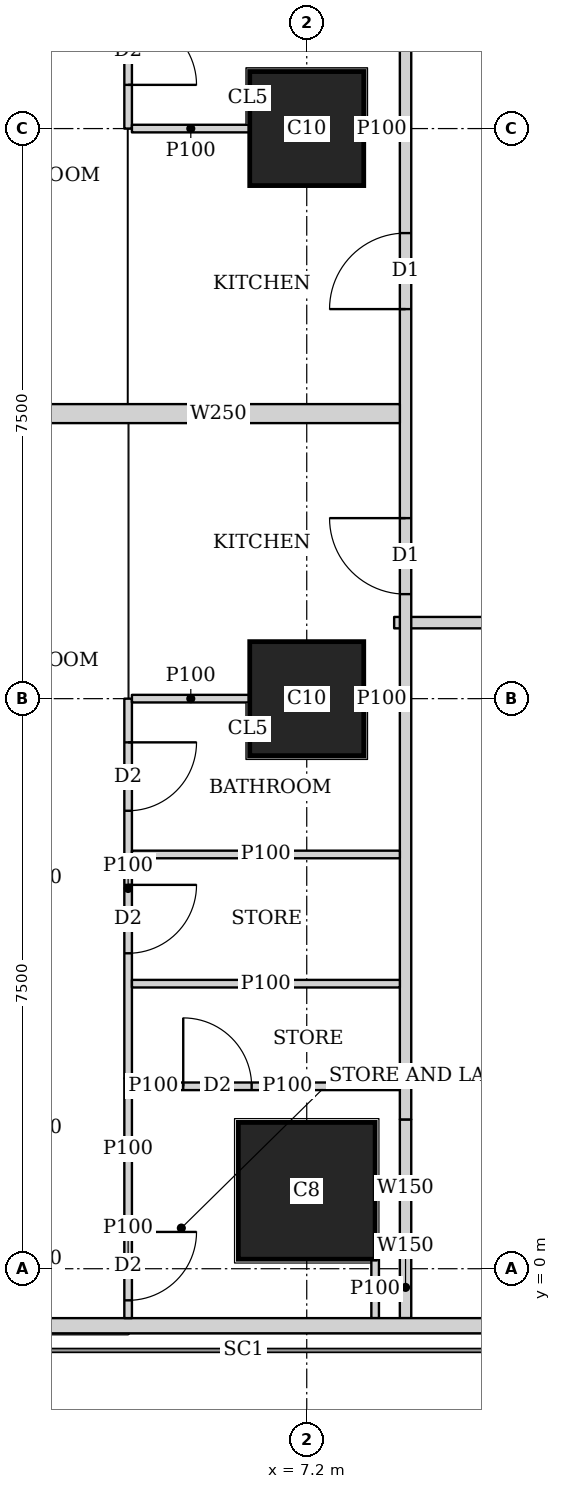
"""IFC4 building model, lengths in metres.
Left out: names, types, materials, properties, quantities, classifications, styles, units other than length and angle.
Written with IfcOpenShell. Run it as: python <this file> out.ifc"""

import sys

from ifc_helpers import new_model, si_unit, direction, frame, frame_2d, origin, origin_2d, place, context, subcontext, project, spatial, rectangle, extrude, element, fill, save


model = new_model("IFC4")
c1 = context("Model", 3, precision=1e-05, world=origin(), true_north=direction((0.0, 1.0)))
c2 = subcontext(c1, "Body", "Model", "MODEL_VIEW")
j1 = project(units=[si_unit("LENGTHUNIT", "METRE"), si_unit("PLANEANGLEUNIT", "RADIAN")], contexts=[c1])
p1 = place(None, origin())
s1 = spatial("IfcSite", under=j1, at=p1, CompositionType="ELEMENT")
p2 = place(p1, origin())
s2 = spatial("IfcBuilding", under=s1, at=p2, CompositionType="ELEMENT")
p3 = place(p2, frame((0.0, 0.0, 135.8)))
s3 = spatial("IfcBuildingStorey", under=s2, at=p3, CompositionType="ELEMENT", Elevation=135.8)
p4 = place(p3, frame((7.2, 1.025, 0.0), z_axis=(0.0, 0.0, 1.0), x_axis=(1.0, 0.0, 0.0)))
e1 = element("IfcColumn", 1, at=p4, inside=s3, PredefinedType="COLUMN", context=c2, shape_type="SweptSolid", body=[
    extrude(rectangle(XDim=1.8, YDim=1.8, at=origin_2d()), origin(), (0.0, 0.0, 1.0), 3.75),
])
for number, where, z_axis, x_axis in (
    (2, (7.2, 7.5, 0.0), (0.0, 0.0, 1.0), (1.0, 0.0, 0.0)),
    (3, (7.2, 15.0, 0.0), (0.0, 0.0, 1.0), (1.0, 0.0, 0.0)),
):
    element("IfcColumn", number, at=place(p3, frame(where, z_axis=z_axis, x_axis=x_axis)), inside=s3, PredefinedType="COLUMN", context=c2, shape_type="SweptSolid", body=[
        extrude(rectangle(XDim=1.5, YDim=1.5, at=origin_2d()), origin(), (0.0, 0.0, 1.0), 3.75),
    ])
p5 = place(p3, frame((2.163, -0.75, 0.0), z_axis=(0.0, 0.0, 1.0), x_axis=(1.0, 0.0, 0.0)))
e4 = element("IfcWall", 4, at=p5, inside=s3, PredefinedType="SOLIDWALL", context=c2, shape_type="SweptSolid", body=[
    extrude(rectangle(XDim=45.628, YDim=0.2, at=frame_2d((22.814, 0.0))), origin(), (0.0, 0.0, 1.0), 3.5),
])
p6 = place(p5, frame((9.537, 0.0, 0.9)))
e5 = element("IfcOpeningElement", 5, at=p6, cuts=e4, PredefinedType="OPENING", context=c2, shape_type="SweptSolid", body=[
    extrude(rectangle(XDim=1.8, YDim=1.5, at=frame_2d((0.9, 0.75))), frame((0.0, 0.11, 0.0), z_axis=(0.0, -1.0, 0.0), x_axis=(1.0, 0.0, 0.0)), (0.0, 0.0, 1.0), 0.22),
])
p7 = place(p5, frame((13.137, 0.0, 0.9)))
e6 = element("IfcOpeningElement", 6, at=p7, cuts=e4, PredefinedType="OPENING", context=c2, shape_type="SweptSolid", body=[
    extrude(rectangle(XDim=1.8, YDim=1.5, at=frame_2d((0.9, 0.75))), frame((0.0, 0.11, 0.0), z_axis=(0.0, -1.0, 0.0), x_axis=(1.0, 0.0, 0.0)), (0.0, 0.0, 1.0), 0.22),
])
p8 = place(p5, frame((16.737, 0.0, 0.9)))
e7 = element("IfcOpeningElement", 7, at=p8, cuts=e4, PredefinedType="OPENING", context=c2, shape_type="SweptSolid", body=[
    extrude(rectangle(XDim=1.8, YDim=1.5, at=frame_2d((0.9, 0.75))), frame((0.0, 0.11, 0.0), z_axis=(0.0, -1.0, 0.0), x_axis=(1.0, 0.0, 0.0)), (0.0, 0.0, 1.0), 0.22),
])
p9 = place(p5, frame((20.337, 0.0, 0.9)))
e8 = element("IfcOpeningElement", 8, at=p9, cuts=e4, PredefinedType="OPENING", context=c2, shape_type="SweptSolid", body=[
    extrude(rectangle(XDim=1.8, YDim=1.5, at=frame_2d((0.9, 0.75))), frame((0.0, 0.11, 0.0), z_axis=(0.0, -1.0, 0.0), x_axis=(1.0, 0.0, 0.0)), (0.0, 0.0, 1.0), 0.22),
])
p10 = place(p5, frame((23.937, 0.0, 0.9)))
e9 = element("IfcOpeningElement", 9, at=p10, cuts=e4, PredefinedType="OPENING", context=c2, shape_type="SweptSolid", body=[
    extrude(rectangle(XDim=1.8, YDim=1.5, at=frame_2d((0.9, 0.75))), frame((0.0, 0.11, 0.0), z_axis=(0.0, -1.0, 0.0), x_axis=(1.0, 0.0, 0.0)), (0.0, 0.0, 1.0), 0.22),
])
p11 = place(p5, frame((27.537, 0.0, 0.9)))
e10 = element("IfcOpeningElement", 10, at=p11, cuts=e4, PredefinedType="OPENING", context=c2, shape_type="SweptSolid", body=[
    extrude(rectangle(XDim=1.8, YDim=1.5, at=frame_2d((0.9, 0.75))), frame((0.0, 0.11, 0.0), z_axis=(0.0, -1.0, 0.0), x_axis=(1.0, 0.0, 0.0)), (0.0, 0.0, 1.0), 0.22),
])
p12 = place(p5, frame((31.137, 0.0, 0.9)))
e11 = element("IfcOpeningElement", 11, at=p12, cuts=e4, PredefinedType="OPENING", context=c2, shape_type="SweptSolid", body=[
    extrude(rectangle(XDim=1.8, YDim=1.5, at=frame_2d((0.9, 0.75))), frame((0.0, 0.11, 0.0), z_axis=(0.0, -1.0, 0.0), x_axis=(1.0, 0.0, 0.0)), (0.0, 0.0, 1.0), 0.22),
])
p13 = place(p5, frame((34.737, 0.0, 0.9)))
e12 = element("IfcOpeningElement", 12, at=p13, cuts=e4, PredefinedType="OPENING", context=c2, shape_type="SweptSolid", body=[
    extrude(rectangle(XDim=1.8, YDim=1.5, at=frame_2d((0.9, 0.75))), frame((0.0, 0.11, 0.0), z_axis=(0.0, -1.0, 0.0), x_axis=(1.0, 0.0, 0.0)), (0.0, 0.0, 1.0), 0.22),
])
p14 = place(p3, frame((8.5, -0.65, 0.0), z_axis=(0.0, 0.0, 1.0), x_axis=(0.0, 1.0, 0.0)))
e13 = element("IfcWall", 13, at=p14, inside=s3, PredefinedType="SOLIDWALL", context=c2, shape_type="SweptSolid", body=[
    extrude(rectangle(XDim=0.809, YDim=0.15, at=frame_2d((0.404, 0.0))), origin(), (0.0, 0.0, 1.0), 3.5),
])
p15 = place(p3, frame((8.5, 0.159, 0.0), z_axis=(0.0, 0.0, 1.0), x_axis=(0.0, 1.0, 0.0)))
e14 = element("IfcWall", 14, at=p15, inside=s3, PredefinedType="SOLIDWALL", context=c2, shape_type="SweptSolid", body=[
    extrude(rectangle(XDim=1.805, YDim=0.15, at=frame_2d((0.903, 0.0))), origin(), (0.0, 0.0, 1.0), 2.1),
])
p16 = place(p3, frame((8.5, 1.964, 0.0), z_axis=(0.0, 0.0, 1.0), x_axis=(0.0, 1.0, 0.0)))
e15 = element("IfcWall", 15, at=p16, inside=s3, PredefinedType="SOLIDWALL", context=c2, shape_type="SweptSolid", body=[
    extrude(rectangle(XDim=41.097, YDim=0.15, at=frame_2d((20.548, 0.0))), origin(), (0.0, 0.0, 1.0), 3.5),
])
p17 = place(p16, frame((6.911, 0.0, 0.0)))
e16 = element("IfcOpeningElement", 16, at=p17, cuts=e15, PredefinedType="OPENING", context=c2, shape_type="SweptSolid", body=[
    extrude(rectangle(XDim=1.0, YDim=2.1, at=frame_2d((0.5, 1.05))), frame((0.0, 0.085, 0.0), z_axis=(0.0, -1.0, 0.0), x_axis=(1.0, 0.0, 0.0)), (0.0, 0.0, 1.0), 0.17),
])
p18 = place(p16, frame((10.661, 0.0, 0.0)))
e17 = element("IfcOpeningElement", 17, at=p18, cuts=e15, PredefinedType="OPENING", context=c2, shape_type="SweptSolid", body=[
    extrude(rectangle(XDim=1.0, YDim=2.1, at=frame_2d((0.5, 1.05))), frame((0.0, 0.085, 0.0), z_axis=(0.0, -1.0, 0.0), x_axis=(1.0, 0.0, 0.0)), (0.0, 0.0, 1.0), 0.17),
])
p19 = place(p16, frame((25.661, 0.0, 0.0)))
e18 = element("IfcOpeningElement", 18, at=p19, cuts=e15, PredefinedType="OPENING", context=c2, shape_type="SweptSolid", body=[
    extrude(rectangle(XDim=1.0, YDim=2.1, at=frame_2d((0.5, 1.05))), frame((0.0, 0.085, 0.0), z_axis=(0.0, -1.0, 0.0), x_axis=(1.0, 0.0, 0.0)), (0.0, 0.0, 1.0), 0.17),
])
p20 = place(p16, frame((33.161, 0.0, 0.0)))
e19 = element("IfcOpeningElement", 19, at=p20, cuts=e15, PredefinedType="OPENING", context=c2, shape_type="SweptSolid", body=[
    extrude(rectangle(XDim=1.0, YDim=2.1, at=frame_2d((0.5, 1.05))), frame((0.0, 0.085, 0.0), z_axis=(0.0, -1.0, 0.0), x_axis=(1.0, 0.0, 0.0)), (0.0, 0.0, 1.0), 0.17),
])
p21 = place(p3, frame((20.599, 8.5, 0.0), z_axis=(0.0, 0.0, 1.0), x_axis=(-1.0, 0.0, 0.0)))
e20 = element("IfcWall", 20, at=p21, inside=s3, PredefinedType="SOLIDWALL", context=c2, shape_type="SweptSolid", body=[
    extrude(rectangle(XDim=12.249, YDim=0.15, at=frame_2d((6.125, 0.0))), origin(), (0.0, 0.0, 1.0), 3.5),
])
p22 = place(p21, frame((8.649, 0.0, 0.0)))
e21 = element("IfcOpeningElement", 21, at=p22, cuts=e20, PredefinedType="OPENING", context=c2, shape_type="SweptSolid", body=[
    extrude(rectangle(XDim=1.0, YDim=2.1, at=frame_2d((0.5, 1.05))), frame((0.0, 0.085, 0.0), z_axis=(0.0, -1.0, 0.0), x_axis=(1.0, 0.0, 0.0)), (0.0, 0.0, 1.0), 0.17),
])
p23 = place(p21, frame((0.699, 0.0, 0.0)))
e22 = element("IfcOpeningElement", 22, at=p23, cuts=e20, PredefinedType="OPENING", context=c2, shape_type="SweptSolid", body=[
    extrude(rectangle(XDim=1.0, YDim=2.1, at=frame_2d((0.5, 1.05))), frame((0.0, 0.085, 0.0), z_axis=(0.0, -1.0, 0.0), x_axis=(1.0, 0.0, 0.0)), (0.0, 0.0, 1.0), 0.17),
])
p24 = place(p3, frame((8.1, 0.124, 0.0), z_axis=(0.0, 0.0, 1.0), x_axis=(0.0, -1.0, 0.0)))
e23 = element("IfcWall", 23, at=p24, inside=s3, PredefinedType="PARTITIONING", context=c2, shape_type="SweptSolid", body=[
    extrude(rectangle(XDim=0.774, YDim=0.1, at=frame_2d((0.387, 0.0))), origin(), (0.0, 0.0, 1.0), 3.5),
])
p25 = place(p3, frame((4.85, -0.65, 0.0), z_axis=(0.0, 0.0, 1.0), x_axis=(0.0, 1.0, 0.0)))
e24 = element("IfcWall", 24, at=p25, inside=s3, PredefinedType="PARTITIONING", context=c2, shape_type="SweptSolid", body=[
    extrude(rectangle(XDim=1.284, YDim=0.1, at=frame_2d((0.642, 0.0))), origin(), (0.0, 0.0, 1.0), 3.5),
])
p26 = place(p25, frame((0.234, 0.0, 0.0)))
e25 = element("IfcOpeningElement", 25, at=p26, cuts=e24, PredefinedType="OPENING", context=c2, shape_type="SweptSolid", body=[
    extrude(rectangle(XDim=0.9, YDim=2.1, at=frame_2d((0.45, 1.05))), frame((0.0, 0.06, 0.0), z_axis=(0.0, -1.0, 0.0), x_axis=(1.0, 0.0, 0.0)), (0.0, 0.0, 1.0), 0.12),
])
p27 = place(p3, frame((4.85, 0.634, 0.0), z_axis=(0.0, 0.0, 1.0), x_axis=(0.0, 1.0, 0.0)))
e26 = element("IfcWall", 26, at=p27, inside=s3, PredefinedType="PARTITIONING", context=c2, shape_type="SweptSolid", body=[
    extrude(rectangle(XDim=1.871, YDim=0.1, at=frame_2d((0.936, 0.0))), origin(), (0.0, 0.0, 1.0), 2.1),
])
p28 = place(p3, frame((4.85, 2.505, 0.0), z_axis=(0.0, 0.0, 1.0), x_axis=(0.0, 1.0, 0.0)))
e27 = element("IfcWall", 27, at=p28, inside=s3, PredefinedType="PARTITIONING", context=c2, shape_type="SweptSolid", body=[
    extrude(rectangle(XDim=4.995, YDim=0.1, at=frame_2d((2.498, 0.0))), origin(), (0.0, 0.0, 1.0), 3.5),
])
p29 = place(p28, frame((3.52, 0.0, 0.0)))
e28 = element("IfcOpeningElement", 28, at=p29, cuts=e27, PredefinedType="OPENING", context=c2, shape_type="SweptSolid", body=[
    extrude(rectangle(XDim=0.9, YDim=2.1, at=frame_2d((0.45, 1.05))), frame((0.0, 0.06, 0.0), z_axis=(0.0, -1.0, 0.0), x_axis=(1.0, 0.0, 0.0)), (0.0, 0.0, 1.0), 0.12),
])
p30 = place(p28, frame((1.645, 0.0, 0.0)))
e29 = element("IfcOpeningElement", 29, at=p30, cuts=e27, PredefinedType="OPENING", context=c2, shape_type="SweptSolid", body=[
    extrude(rectangle(XDim=0.9, YDim=2.1, at=frame_2d((0.45, 1.05))), frame((0.0, 0.06, 0.0), z_axis=(0.0, -1.0, 0.0), x_axis=(1.0, 0.0, 0.0)), (0.0, 0.0, 1.0), 0.12),
])
p31 = place(p3, frame((4.9, 3.75, 0.0), z_axis=(0.0, 0.0, 1.0), x_axis=(1.0, 0.0, 0.0)))
e30 = element("IfcWall", 30, at=p31, inside=s3, PredefinedType="PARTITIONING", context=c2, shape_type="SweptSolid", body=[
    extrude(rectangle(XDim=3.525, YDim=0.1, at=frame_2d((1.763, 0.0))), origin(), (0.0, 0.0, 1.0), 3.5),
])
p32 = place(p3, frame((4.9, 7.5, 0.0), z_axis=(0.0, 0.0, 1.0), x_axis=(1.0, 0.0, 0.0)))
e31 = element("IfcWall", 31, at=p32, inside=s3, PredefinedType="PARTITIONING", context=c2, shape_type="SweptSolid", body=[
    extrude(rectangle(XDim=1.549, YDim=0.1, at=frame_2d((0.774, 0.0))), origin(), (0.0, 0.0, 1.0), 3.5),
])
p33 = place(p3, frame((7.951, 7.5, 0.0), z_axis=(0.0, 0.0, 1.0), x_axis=(1.0, 0.0, 0.0)))
e32 = element("IfcWall", 32, at=p33, inside=s3, PredefinedType="PARTITIONING", context=c2, shape_type="SweptSolid", body=[
    extrude(rectangle(XDim=0.474, YDim=0.1, at=frame_2d((0.237, 0.0))), origin(), (0.0, 0.0, 1.0), 3.5),
])
p34 = place(p3, frame((4.9, 5.45, 0.0), z_axis=(0.0, 0.0, 1.0), x_axis=(1.0, 0.0, 0.0)))
e33 = element("IfcWall", 33, at=p34, inside=s3, PredefinedType="PARTITIONING", context=c2, shape_type="SweptSolid", body=[
    extrude(rectangle(XDim=3.525, YDim=0.1, at=frame_2d((1.763, 0.0))), origin(), (0.0, 0.0, 1.0), 3.5),
])
p35 = place(p3, frame((4.85, 15.0, 0.0), z_axis=(0.0, 0.0, 1.0), x_axis=(0.0, 1.0, 0.0)))
e34 = element("IfcWall", 34, at=p35, inside=s3, PredefinedType="PARTITIONING", context=c2, shape_type="SweptSolid", body=[
    extrude(rectangle(XDim=11.125, YDim=0.1, at=frame_2d((5.562, 0.0))), origin(), (0.0, 0.0, 1.0), 3.5),
])
p36 = place(p35, frame((0.575, 0.0, 0.0)))
e35 = element("IfcOpeningElement", 35, at=p36, cuts=e34, PredefinedType="OPENING", context=c2, shape_type="SweptSolid", body=[
    extrude(rectangle(XDim=0.9, YDim=2.1, at=frame_2d((0.45, 1.05))), frame((0.0, 0.06, 0.0), z_axis=(0.0, -1.0, 0.0), x_axis=(1.0, 0.0, 0.0)), (0.0, 0.0, 1.0), 0.12),
])
p37 = place(p35, frame((4.1, 0.0, 0.0)))
e36 = element("IfcOpeningElement", 36, at=p37, cuts=e34, PredefinedType="OPENING", context=c2, shape_type="SweptSolid", body=[
    extrude(rectangle(XDim=0.9, YDim=2.1, at=frame_2d((0.45, 1.05))), frame((0.0, 0.06, 0.0), z_axis=(0.0, -1.0, 0.0), x_axis=(1.0, 0.0, 0.0)), (0.0, 0.0, 1.0), 0.12),
])
p38 = place(p35, frame((7.9, 0.0, 0.0)))
e37 = element("IfcOpeningElement", 37, at=p38, cuts=e34, PredefinedType="OPENING", context=c2, shape_type="SweptSolid", body=[
    extrude(rectangle(XDim=0.9, YDim=2.1, at=frame_2d((0.45, 1.05))), frame((0.0, 0.06, 0.0), z_axis=(0.0, -1.0, 0.0), x_axis=(1.0, 0.0, 0.0)), (0.0, 0.0, 1.0), 0.12),
])
p39 = place(p35, frame((2.45, 0.0, 0.0)))
e38 = element("IfcOpeningElement", 38, at=p39, cuts=e34, PredefinedType="OPENING", context=c2, shape_type="SweptSolid", body=[
    extrude(rectangle(XDim=0.9, YDim=2.1, at=frame_2d((0.45, 1.05))), frame((0.0, 0.06, 0.0), z_axis=(0.0, -1.0, 0.0), x_axis=(1.0, 0.0, 0.0)), (0.0, 0.0, 1.0), 0.12),
])
p40 = place(p35, frame((5.975, 0.0, 0.0)))
e39 = element("IfcOpeningElement", 39, at=p40, cuts=e34, PredefinedType="OPENING", context=c2, shape_type="SweptSolid", body=[
    extrude(rectangle(XDim=0.9, YDim=2.1, at=frame_2d((0.45, 1.05))), frame((0.0, 0.06, 0.0), z_axis=(0.0, -1.0, 0.0), x_axis=(1.0, 0.0, 0.0)), (0.0, 0.0, 1.0), 0.12),
])
p41 = place(p35, frame((9.775, 0.0, 0.0)))
e40 = element("IfcOpeningElement", 40, at=p41, cuts=e34, PredefinedType="OPENING", context=c2, shape_type="SweptSolid", body=[
    extrude(rectangle(XDim=0.9, YDim=2.1, at=frame_2d((0.45, 1.05))), frame((0.0, 0.06, 0.0), z_axis=(0.0, -1.0, 0.0), x_axis=(1.0, 0.0, 0.0)), (0.0, 0.0, 1.0), 0.12),
])
p42 = place(p3, frame((4.9, 15.0, 0.0), z_axis=(0.0, 0.0, 1.0), x_axis=(1.0, 0.0, 0.0)))
e41 = element("IfcWall", 41, at=p42, inside=s3, PredefinedType="PARTITIONING", context=c2, shape_type="SweptSolid", body=[
    extrude(rectangle(XDim=1.549, YDim=0.1, at=frame_2d((0.774, 0.0))), origin(), (0.0, 0.0, 1.0), 3.5),
])
p43 = place(p3, frame((7.951, 15.0, 0.0), z_axis=(0.0, 0.0, 1.0), x_axis=(1.0, 0.0, 0.0)))
e42 = element("IfcWall", 42, at=p43, inside=s3, PredefinedType="PARTITIONING", context=c2, shape_type="SweptSolid", body=[
    extrude(rectangle(XDim=0.474, YDim=0.1, at=frame_2d((0.237, 0.0))), origin(), (0.0, 0.0, 1.0), 3.5),
])
p44 = place(p3, frame((3.65, 11.25, 0.0), z_axis=(0.0, 0.0, 1.0), x_axis=(1.0, 0.0, 0.0)))
e43 = element("IfcWall", 43, at=p44, inside=s3, PredefinedType="SOLIDWALL", context=c2, shape_type="SweptSolid", body=[
    extrude(rectangle(XDim=4.775, YDim=0.25, at=frame_2d((2.388, 0.0))), origin(), (0.0, 0.0, 1.0), 3.5),
])
p45 = place(p3, frame((5.467, 2.4, 0.0), z_axis=(0.0, 0.0, 1.0), x_axis=(1.0, 0.0, 0.0)))
e44 = element("IfcWall", 44, at=p45, inside=s3, PredefinedType="PARTITIONING", context=c2, shape_type="SweptSolid", body=[
    extrude(rectangle(XDim=2.958, YDim=0.1, at=frame_2d((1.479, 0.0))), origin(), (0.0, 0.0, 1.0), 3.5),
])
p46 = place(p45, frame((0.108, 0.0, 0.0)))
e45 = element("IfcOpeningElement", 45, at=p46, cuts=e44, PredefinedType="OPENING", context=c2, shape_type="SweptSolid", body=[
    extrude(rectangle(XDim=0.9, YDim=2.1, at=frame_2d((0.45, 1.05))), frame((0.0, 0.06, 0.0), z_axis=(0.0, -1.0, 0.0), x_axis=(1.0, 0.0, 0.0)), (0.0, 0.0, 1.0), 0.12),
])
p47 = place(p3, frame((5.467, 2.4, 0.0), z_axis=(0.0, 0.0, 1.0), x_axis=(-1.0, 0.0, 0.0)))
e46 = element("IfcWall", 46, at=p47, inside=s3, PredefinedType="PARTITIONING", context=c2, shape_type="SweptSolid", body=[
    extrude(rectangle(XDim=0.567, YDim=0.1, at=frame_2d((0.284, 0.0))), origin(), (0.0, 0.0, 1.0), 2.1),
])
p48 = place(p29, origin())
e47 = element("IfcDoor", 47, at=p48, inside=s3, OperationType="SINGLE_SWING_LEFT", PredefinedType="DOOR", context=c2, shape_type="SweptSolid", body=[
    extrude(rectangle(XDim=0.9, YDim=2.1, at=frame_2d((0.45, 1.05))), frame((0.0, 0.025, 0.0), z_axis=(0.0, -1.0, 0.0), x_axis=(1.0, 0.0, 0.0)), (0.0, 0.0, 1.0), 0.05),
])
fill(e28, e47)
p49 = place(p26, origin())
e48 = element("IfcDoor", 48, at=p49, inside=s3, OperationType="SINGLE_SWING_LEFT", PredefinedType="DOOR", context=c2, shape_type="SweptSolid", body=[
    extrude(rectangle(XDim=0.9, YDim=2.1, at=frame_2d((0.45, 1.05))), frame((0.0, 0.025, 0.0), z_axis=(0.0, -1.0, 0.0), x_axis=(1.0, 0.0, 0.0)), (0.0, 0.0, 1.0), 0.05),
])
fill(e25, e48)
p50 = place(p30, origin())
e49 = element("IfcDoor", 49, at=p50, inside=s3, OperationType="SINGLE_SWING_LEFT", PredefinedType="DOOR", context=c2, shape_type="SweptSolid", body=[
    extrude(rectangle(XDim=0.9, YDim=2.1, at=frame_2d((0.45, 1.05))), frame((0.0, 0.025, 0.0), z_axis=(0.0, -1.0, 0.0), x_axis=(1.0, 0.0, 0.0)), (0.0, 0.0, 1.0), 0.05),
])
fill(e29, e49)
p51 = place(p17, origin())
e50 = element("IfcDoor", 50, at=p51, inside=s3, OperationType="SINGLE_SWING_RIGHT", PredefinedType="DOOR", context=c2, shape_type="SweptSolid", body=[
    extrude(rectangle(XDim=1.0, YDim=2.1, at=frame_2d((0.5, 1.05))), frame((0.0, 0.025, 0.0), z_axis=(0.0, -1.0, 0.0), x_axis=(1.0, 0.0, 0.0)), (0.0, 0.0, 1.0), 0.05),
])
fill(e16, e50)
p52 = place(p36, origin())
e51 = element("IfcDoor", 51, at=p52, inside=s3, OperationType="SINGLE_SWING_RIGHT", PredefinedType="DOOR", context=c2, shape_type="SweptSolid", body=[
    extrude(rectangle(XDim=0.9, YDim=2.1, at=frame_2d((0.45, 1.05))), frame((0.0, 0.025, 0.0), z_axis=(0.0, -1.0, 0.0), x_axis=(1.0, 0.0, 0.0)), (0.0, 0.0, 1.0), 0.05),
])
fill(e35, e51)
p53 = place(p18, origin())
e52 = element("IfcDoor", 52, at=p53, inside=s3, OperationType="SINGLE_SWING_LEFT", PredefinedType="DOOR", context=c2, shape_type="SweptSolid", body=[
    extrude(rectangle(XDim=1.0, YDim=2.1, at=frame_2d((0.5, 1.05))), frame((0.0, 0.025, 0.0), z_axis=(0.0, -1.0, 0.0), x_axis=(1.0, 0.0, 0.0)), (0.0, 0.0, 1.0), 0.05),
])
fill(e17, e52)
p54 = place(p46, origin())
e53 = element("IfcDoor", 53, at=p54, inside=s3, OperationType="SINGLE_SWING_LEFT", PredefinedType="DOOR", context=c2, shape_type="SweptSolid", body=[
    extrude(rectangle(XDim=0.9, YDim=2.1, at=frame_2d((0.45, 1.05))), frame((0.0, 0.025, 0.0), z_axis=(0.0, -1.0, 0.0), x_axis=(1.0, 0.0, 0.0)), (0.0, 0.0, 1.0), 0.05),
])
fill(e45, e53)
save(model, sys.argv[1])
